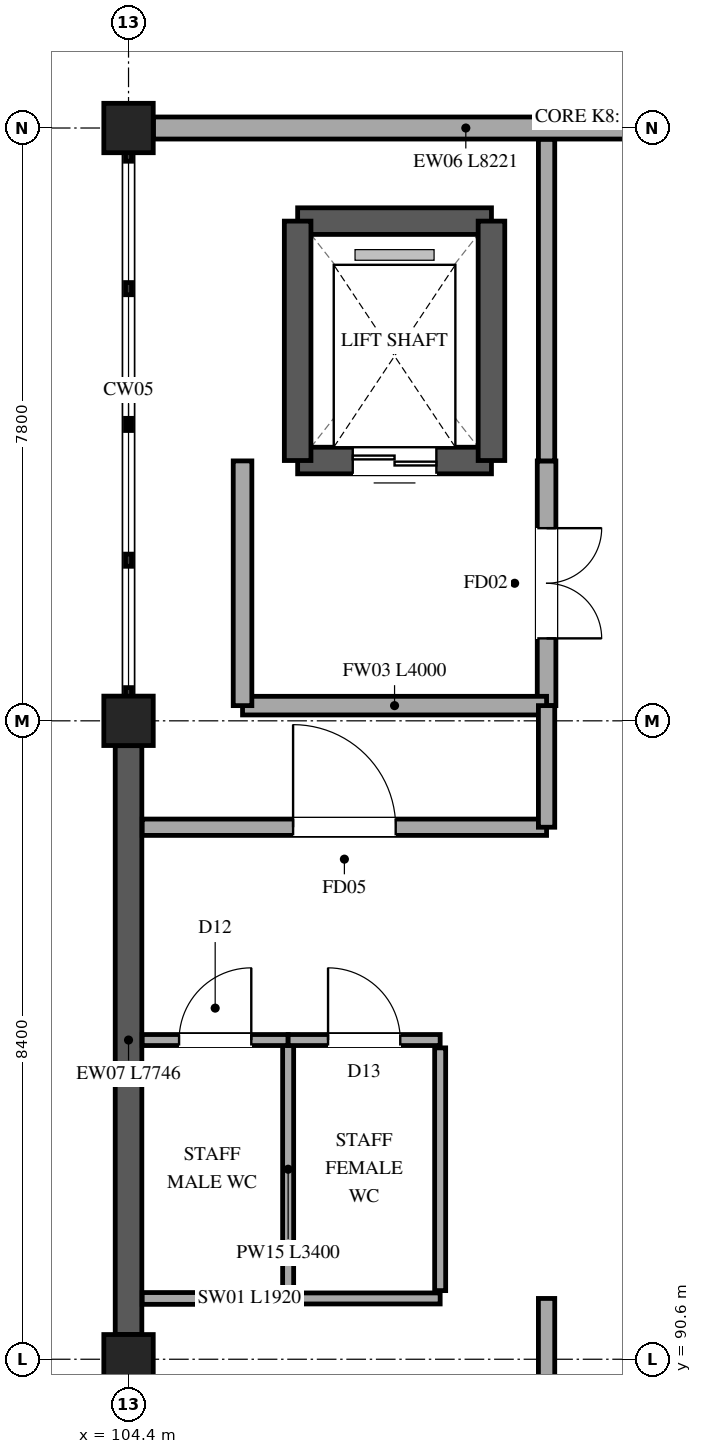
"""IFC4 building model, lengths in metres.
Left out: names, types, materials, properties, quantities, classifications, styles, units other than length and angle.
Written with IfcOpenShell. Run it as: python <this file> out.ifc"""

import sys

from ifc_helpers import new_model, si_unit, direction, frame, frame_2d, origin, origin_2d, place, context, subcontext, project, spatial, rectangle, extrude, element, fill, save


model = new_model("IFC4")
c1 = context("Model", 3, precision=1e-05, world=origin(), true_north=direction((0.0, 1.0)))
c2 = subcontext(c1, "Body", "Model", "MODEL_VIEW")
j1 = project(units=[si_unit("LENGTHUNIT", "METRE"), si_unit("PLANEANGLEUNIT", "RADIAN")], contexts=[c1])
p1 = place(None, origin())
s1 = spatial("IfcSite", under=j1, at=p1, CompositionType="ELEMENT")
p2 = place(p1, origin())
s2 = spatial("IfcBuilding", under=s1, at=p2, CompositionType="ELEMENT")
p3 = place(p2, frame((0.0, 0.0, 36.3)))
s3 = spatial("IfcBuildingStorey", under=s2, at=p3, CompositionType="ELEMENT", Elevation=36.3)
for number, where, z_axis, x_axis in (
    (1, (104.4, 90.6, 0.0), (0.0, 0.0, 1.0), (1.0, 0.0, 0.0)),
    (2, (104.4, 99.0, 0.0), (0.0, 0.0, 1.0), (1.0, 0.0, 0.0)),
    (3, (104.4, 106.8, 0.0), (0.0, 0.0, 1.0), (1.0, 0.0, 0.0)),
):
    element("IfcColumn", number, at=place(p3, frame(where, z_axis=z_axis, x_axis=x_axis)), inside=s3, PredefinedType="COLUMN", context=c2, shape_type="SweptSolid", body=[
        extrude(rectangle(XDim=0.65, YDim=0.65, at=origin_2d()), origin(), (0.0, 0.0, 1.0), 4.8),
    ])
p4 = place(p3, frame((104.4, 90.927, 0.0), z_axis=(0.0, 0.0, 1.0), x_axis=(0.0, 1.0, 0.0)))
e4 = element("IfcWall", 4, at=p4, inside=s3, PredefinedType="STANDARD", context=c2, shape_type="SweptSolid", body=[
    extrude(rectangle(XDim=7.746, YDim=0.35, at=frame_2d((3.873, 0.0))), origin(), (0.0, 0.0, 1.0), 4.49),
])
p5 = place(p3, frame((104.727, 106.8, 0.0), z_axis=(0.0, 0.0, 1.0), x_axis=(1.0, 0.0, 0.0)))
e5 = element("IfcWall", 5, at=p5, inside=s3, PredefinedType="STANDARD", context=c2, shape_type="SweptSolid", body=[
    extrude(rectangle(XDim=8.221, YDim=0.29, at=frame_2d((4.11, 0.0))), origin(), (0.0, 0.0, 1.0), 3.795),
])
p6 = place(p3, frame((106.625, 105.575, 0.0), z_axis=(0.0, 0.0, 1.0), x_axis=(1.0, 0.0, 0.0)))
e6 = element("IfcWall", 6, at=p6, inside=s3, PredefinedType="SHEAR", context=c2, shape_type="SweptSolid", body=[
    extrude(rectangle(XDim=2.55, YDim=0.35, at=frame_2d((1.275, 0.0))), origin(), (0.0, 0.0, 1.0), 4.8),
])
p7 = place(p3, frame((109.175, 102.425, 0.0), z_axis=(0.0, 0.0, 1.0), x_axis=(-1.0, 0.0, 0.0)))
e7 = element("IfcWall", 7, at=p7, inside=s3, PredefinedType="SHEAR", context=c2, shape_type="SweptSolid", body=[
    extrude(rectangle(XDim=2.55, YDim=0.35, at=frame_2d((1.275, 0.0))), origin(), (0.0, 0.0, 1.0), 4.8),
])
p8 = place(p7, frame((0.725, 0.0, 0.0)))
e8 = element("IfcOpeningElement", 8, at=p8, cuts=e7, PredefinedType="OPENING", context=c2, shape_type="SweptSolid", body=[
    extrude(rectangle(XDim=1.1, YDim=2.2, at=frame_2d((0.55, 1.1))), frame((0.0, 0.185, 0.0), z_axis=(0.0, -1.0, 0.0), x_axis=(1.0, 0.0, 0.0)), (0.0, 0.0, 1.0), 0.37),
])
for number, where, z_axis, x_axis in (
    (9, (106.625, 102.425, 0.0), (0.0, 0.0, 1.0), (0.0, 1.0, 0.0)),
    (10, (109.175, 105.575, 0.0), (0.0, 0.0, 1.0), (0.0, -1.0, 0.0)),
):
    element("IfcWall", number, at=place(p3, frame(where, z_axis=z_axis, x_axis=x_axis)), inside=s3, PredefinedType="SHEAR", context=c2, shape_type="SweptSolid", body=[
        extrude(rectangle(XDim=3.15, YDim=0.35, at=frame_2d((1.575, 0.0))), origin(), (0.0, 0.0, 1.0), 4.8),
    ])
p9 = place(p3, frame((109.9, 102.42, 0.0), z_axis=(0.0, 0.0, 1.0), x_axis=(0.0, -1.0, 0.0)))
e11 = element("IfcWall", 11, at=p9, inside=s3, PredefinedType="STANDARD", context=c2, shape_type="SweptSolid", body=[
    extrude(rectangle(XDim=3.22, YDim=0.245, at=frame_2d((1.61, 0.0))), origin(), (0.0, 0.0, 1.0), 3.8),
])
p10 = place(p9, frame((0.885, 0.0, 0.0)))
e12 = element("IfcOpeningElement", 12, at=p10, cuts=e11, PredefinedType="OPENING", context=c2, shape_type="SweptSolid", body=[
    extrude(rectangle(XDim=1.45, YDim=2.2, at=frame_2d((0.725, 1.1))), frame((0.0, 0.133, 0.0), z_axis=(0.0, -1.0, 0.0), x_axis=(1.0, 0.0, 0.0)), (0.0, 0.0, 1.0), 0.265),
])
p11 = place(p3, frame((109.9, 99.2, 0.0), z_axis=(0.0, 0.0, 1.0), x_axis=(-1.0, 0.0, 0.0)))
e13 = element("IfcWall", 13, at=p11, inside=s3, PredefinedType="STANDARD", context=c2, shape_type="SweptSolid", body=[
    extrude(rectangle(XDim=4.0, YDim=0.245, at=frame_2d((2.0, 0.0))), origin(), (0.0, 0.0, 1.0), 3.8),
])
p12 = place(p3, frame((105.9, 99.2, 0.0), z_axis=(0.0, 0.0, 1.0), x_axis=(0.0, 1.0, 0.0)))
e14 = element("IfcWall", 14, at=p12, inside=s3, PredefinedType="STANDARD", context=c2, shape_type="SweptSolid", body=[
    extrude(rectangle(XDim=3.22, YDim=0.245, at=frame_2d((1.61, 0.0))), origin(), (0.0, 0.0, 1.0), 3.8),
])
p13 = place(p3, frame((106.5, 94.8, 0.0), z_axis=(0.0, 0.0, 1.0), x_axis=(0.0, -1.0, 0.0)))
e15 = element("IfcWall", 15, at=p13, inside=s3, PredefinedType="PARTITIONING", context=c2, shape_type="SweptSolid", body=[
    extrude(rectangle(XDim=3.4, YDim=0.145, at=frame_2d((1.7, 0.0))), origin(), (0.0, 0.0, 1.0), 4.46),
])
p14 = place(p3, frame((104.58, 94.8, 0.0), z_axis=(0.0, 0.0, 1.0), x_axis=(1.0, 0.0, 0.0)))
e16 = element("IfcWall", 16, at=p14, inside=s3, PredefinedType="PARTITIONING", context=c2, shape_type="SweptSolid", body=[
    extrude(rectangle(XDim=1.92, YDim=0.145, at=frame_2d((0.96, 0.0))), origin(), (0.0, 0.0, 1.0), 3.8),
])
p15 = place(p14, frame((0.485, 0.0, 0.0)))
e17 = element("IfcOpeningElement", 17, at=p15, cuts=e16, PredefinedType="OPENING", context=c2, shape_type="SweptSolid", body=[
    extrude(rectangle(XDim=0.95, YDim=2.15, at=frame_2d((0.475, 1.075))), frame((0.0, 0.083, 0.0), z_axis=(0.0, -1.0, 0.0), x_axis=(1.0, 0.0, 0.0)), (0.0, 0.0, 1.0), 0.165),
])
p16 = place(p3, frame((106.5, 91.4, 0.0), z_axis=(0.0, 0.0, 1.0), x_axis=(-1.0, 0.0, 0.0)))
e18 = element("IfcWall", 18, at=p16, inside=s3, PredefinedType="MOVABLE", context=c2, shape_type="SweptSolid", body=[
    extrude(rectangle(XDim=1.92, YDim=0.155, at=frame_2d((0.96, 0.0))), origin(), (0.0, 0.0, 1.0), 3.8),
])
p17 = place(p3, frame((106.5, 94.8, 0.0), z_axis=(0.0, 0.0, 1.0), x_axis=(1.0, 0.0, 0.0)))
e19 = element("IfcWall", 19, at=p17, inside=s3, PredefinedType="PARTITIONING", context=c2, shape_type="SweptSolid", body=[
    extrude(rectangle(XDim=2.0, YDim=0.145, at=frame_2d((1.0, 0.0))), origin(), (0.0, 0.0, 1.0), 4.46),
])
p18 = place(p17, frame((0.525, 0.0, 0.0)))
e20 = element("IfcOpeningElement", 20, at=p18, cuts=e19, PredefinedType="OPENING", context=c2, shape_type="SweptSolid", body=[
    extrude(rectangle(XDim=0.95, YDim=2.2, at=frame_2d((0.475, 1.1))), frame((0.0, 0.083, 0.0), z_axis=(0.0, -1.0, 0.0), x_axis=(1.0, 0.0, 0.0)), (0.0, 0.0, 1.0), 0.165),
])
p19 = place(p3, frame((108.5, 91.4, 0.0), z_axis=(0.0, 0.0, 1.0), x_axis=(-1.0, 0.0, 0.0)))
e21 = element("IfcWall", 21, at=p19, inside=s3, PredefinedType="PARTITIONING", context=c2, shape_type="SweptSolid", body=[
    extrude(rectangle(XDim=2.0, YDim=0.145, at=frame_2d((1.0, 0.0))), origin(), (0.0, 0.0, 1.0), 4.46),
])
p20 = place(p3, frame((109.9, 80.7, 0.0), z_axis=(0.0, 0.0, 1.0), x_axis=(0.0, 1.0, 0.0)))
e22 = element("IfcWall", 22, at=p20, inside=s3, PredefinedType="PARTITIONING", context=c2, shape_type="SweptSolid", body=[
    extrude(rectangle(XDim=10.7, YDim=0.215, at=frame_2d((5.35, 0.0))), origin(), (0.0, 0.0, 1.0), 3.8),
])
p21 = place(p20, frame((4.675, 0.0, 0.0)))
e23 = element("IfcOpeningElement", 23, at=p21, cuts=e22, PredefinedType="OPENING", context=c2, shape_type="SweptSolid", body=[
    extrude(rectangle(XDim=1.35, YDim=2.2, at=frame_2d((0.675, 1.1))), frame((0.0, 0.118, 0.0), z_axis=(0.0, -1.0, 0.0), x_axis=(1.0, 0.0, 0.0)), (0.0, 0.0, 1.0), 0.235),
])
p22 = place(p3, frame((104.58, 97.6, 0.0), z_axis=(0.0, 0.0, 1.0), x_axis=(1.0, 0.0, 0.0)))
e24 = element("IfcWall", 24, at=p22, inside=s3, PredefinedType="PARTITIONING", context=c2, shape_type="SweptSolid", body=[
    extrude(rectangle(XDim=5.32, YDim=0.215, at=frame_2d((2.66, 0.0))), origin(), (0.0, 0.0, 1.0), 3.8),
])
p23 = place(p22, frame((1.985, 0.0, 0.0)))
e25 = element("IfcOpeningElement", 25, at=p23, cuts=e24, PredefinedType="OPENING", context=c2, shape_type="SweptSolid", body=[
    extrude(rectangle(XDim=1.35, YDim=2.2, at=frame_2d((0.675, 1.1))), frame((0.0, 0.118, 0.0), z_axis=(0.0, -1.0, 0.0), x_axis=(1.0, 0.0, 0.0)), (0.0, 0.0, 1.0), 0.235),
])
p24 = place(p3, frame((109.9, 97.6, 0.0), z_axis=(0.0, 0.0, 1.0), x_axis=(0.0, 1.0, 0.0)))
e26 = element("IfcWall", 26, at=p24, inside=s3, PredefinedType="PARTITIONING", context=c2, shape_type="SweptSolid", body=[
    extrude(rectangle(XDim=1.6, YDim=0.215, at=frame_2d((0.8, 0.0))), origin(), (0.0, 0.0, 1.0), 3.8),
])
p25 = place(p3, frame((109.9, 102.42, 0.0), z_axis=(0.0, 0.0, 1.0), x_axis=(0.0, 1.0, 0.0)))
e27 = element("IfcWall", 27, at=p25, inside=s3, PredefinedType="PARTITIONING", context=c2, shape_type="SweptSolid", body=[
    extrude(rectangle(XDim=4.23, YDim=0.215, at=frame_2d((2.115, 0.0))), origin(), (0.0, 0.0, 1.0), 3.8),
])
p26 = place(p3, frame((108.5, 94.697, 0.0), z_axis=(0.0, 0.0, 1.0), x_axis=(0.0, -1.0, 0.0)))
e28 = element("IfcWall", 28, at=p26, inside=s3, PredefinedType="PARTITIONING", context=c2, shape_type="SweptSolid", body=[
    extrude(rectangle(XDim=3.194, YDim=0.145, at=frame_2d((1.597, 0.0))), origin(), (0.0, 0.0, 1.0), 4.46),
])
p27 = place(p8, origin())
e29 = element("IfcDoor", 29, at=p27, inside=s3, OperationType="DOUBLE_DOOR_SLIDING", PredefinedType="DOOR", context=c2, shape_type="SweptSolid", body=[
    extrude(rectangle(XDim=1.1, YDim=2.2, at=frame_2d((0.55, 1.1))), frame((0.0, 0.025, 0.0), z_axis=(0.0, -1.0, 0.0), x_axis=(1.0, 0.0, 0.0)), (0.0, 0.0, 1.0), 0.05),
])
fill(e8, e29)
p28 = place(p10, origin())
e30 = element("IfcDoor", 30, at=p28, inside=s3, OperationType="DOUBLE_DOOR_SINGLE_SWING", PredefinedType="DOOR", context=c2, shape_type="SweptSolid", body=[
    extrude(rectangle(XDim=1.45, YDim=2.2, at=frame_2d((0.725, 1.1))), frame((0.0, 0.025, 0.0), z_axis=(0.0, -1.0, 0.0), x_axis=(1.0, 0.0, 0.0)), (0.0, 0.0, 1.0), 0.05),
])
fill(e12, e30)
p29 = place(p15, origin())
e31 = element("IfcDoor", 31, at=p29, inside=s3, OperationType="SINGLE_SWING_RIGHT", PredefinedType="DOOR", context=c2, shape_type="SweptSolid", body=[
    extrude(rectangle(XDim=0.95, YDim=2.15, at=frame_2d((0.475, 1.075))), frame((0.0, 0.025, 0.0), z_axis=(0.0, -1.0, 0.0), x_axis=(1.0, 0.0, 0.0)), (0.0, 0.0, 1.0), 0.05),
])
fill(e17, e31)
p30 = place(p18, origin())
e32 = element("IfcDoor", 32, at=p30, inside=s3, OperationType="SINGLE_SWING_LEFT", PredefinedType="DOOR", context=c2, shape_type="SweptSolid", body=[
    extrude(rectangle(XDim=0.95, YDim=2.2, at=frame_2d((0.475, 1.1))), frame((0.0, 0.025, 0.0), z_axis=(0.0, -1.0, 0.0), x_axis=(1.0, 0.0, 0.0)), (0.0, 0.0, 1.0), 0.05),
])
fill(e20, e32)
p31 = place(p23, origin())
e33 = element("IfcDoor", 33, at=p31, inside=s3, OperationType="SINGLE_SWING_LEFT", PredefinedType="DOOR", context=c2, shape_type="SweptSolid", body=[
    extrude(rectangle(XDim=1.35, YDim=2.2, at=frame_2d((0.675, 1.1))), frame((0.0, 0.025, 0.0), z_axis=(0.0, -1.0, 0.0), x_axis=(1.0, 0.0, 0.0)), (0.0, 0.0, 1.0), 0.05),
])
fill(e25, e33)
save(model, sys.argv[1])
